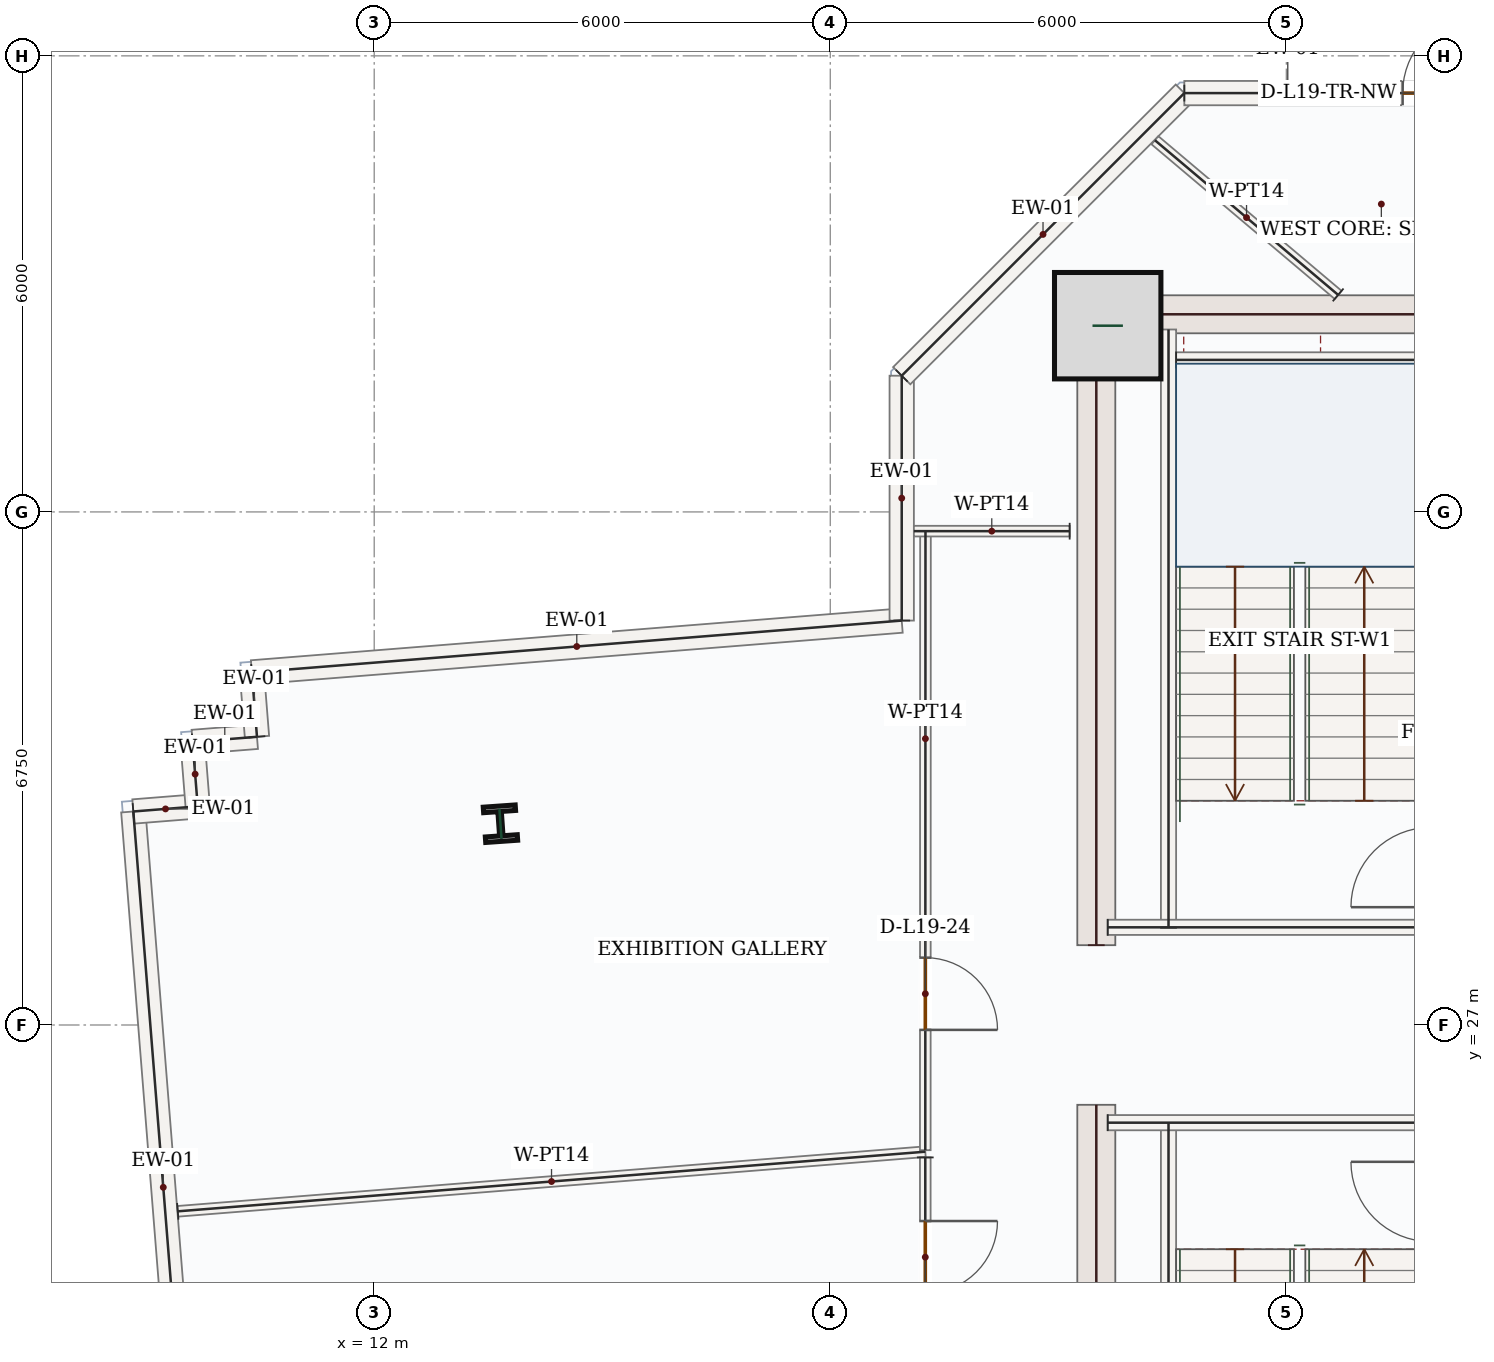
"""IFC4 building model, lengths in metres.
Left out: names, types, materials, properties, quantities, classifications, styles, units other than length and angle.
Written with IfcOpenShell. Run it as: python <this file> out.ifc"""

import sys

from ifc_helpers import new_model, si_unit, direction, frame, frame_2d, origin, origin_2d, place, context, subcontext, project, spatial, rectangle, i_section, extrude, source, transform, mapped, element, fill, save


model = new_model("IFC4")
c1 = context("Model", 3, precision=1e-05, world=origin(), true_north=direction((0.0, 1.0)))
c2 = subcontext(c1, "Body", "Model", "MODEL_VIEW")
j1 = project(units=[si_unit("LENGTHUNIT", "METRE"), si_unit("PLANEANGLEUNIT", "RADIAN")], contexts=[c1])
p1 = place(None, origin())
s1 = spatial("IfcSite", under=j1, at=p1, CompositionType="ELEMENT")
p2 = place(p1, origin())
s2 = spatial("IfcBuilding", under=s1, at=p2, CompositionType="ELEMENT")
p3 = place(p2, frame((0.0, 0.0, 87.9)))
s3 = spatial("IfcBuildingStorey", under=s2, at=p3, CompositionType="ELEMENT", Elevation=87.9)
m1 = source(origin(), c2, "Body", "SweptSolid", [
    extrude(rectangle(XDim=8.55, YDim=0.5, at=frame_2d((4.275, 0.0))), origin(), (0.0, 0.0, 1.0), 3.95),
])
for number, where, z_axis, x_axis in (
    (1, (21.5, 17.4, 0.0), (0.0, 0.0, 1.0), (0.0, 1.0, 0.0)),
    (2, (21.5, 28.05, 0.0), (0.0, 0.0, 1.0), (0.0, 1.0, 0.0)),
):
    element("IfcWall", number, at=place(p3, frame(where, z_axis=z_axis, x_axis=x_axis)), inside=s3, PredefinedType="SHEAR", context=c2, shape_type="MappedRepresentation", body=[
        mapped(m1, transform((0.0, 0.0, 0.0), x_axis=(1.0, 0.0, 0.0), y_axis=(0.0, 1.0, 0.0), z_axis=(0.0, 0.0, 1.0), scale=1.0)),
    ])
m2 = source(origin(), c2, "Body", "SweptSolid", [
    extrude(rectangle(XDim=7.0, YDim=0.5, at=frame_2d((3.5, 0.0))), origin(), (0.0, 0.0, 1.0), 3.95),
])
p4 = place(p3, frame((21.75, 36.35, 0.0), z_axis=(0.0, 0.0, 1.0), x_axis=(1.0, 0.0, 0.0)))
e3 = element("IfcWall", 3, at=p4, inside=s3, PredefinedType="SHEAR", context=c2, shape_type="MappedRepresentation", body=[
    mapped(m2, transform((0.0, 0.0, 0.0), x_axis=(1.0, 0.0, 0.0), y_axis=(0.0, 1.0, 0.0), z_axis=(0.0, 0.0, 1.0), scale=1.0)),
])
m3 = source(origin(), c2, "Body", "SweptSolid", [
    extrude(rectangle(XDim=1.4, YDim=1.4, at=origin_2d()), origin(), (0.0, 0.0, 1.0), 4.2),
])
p5 = place(p3, frame((21.65, 36.2, 0.0), z_axis=(0.0, 0.0, 1.0), x_axis=(1.0, 0.0, 0.0)))
e4 = element("IfcColumn", 4, at=p5, inside=s3, PredefinedType="COLUMN", context=c2, shape_type="MappedRepresentation", body=[
    mapped(m3, transform((0.0, 0.0, 0.0), x_axis=(1.0, 0.0, 0.0), y_axis=(0.0, 1.0, 0.0), z_axis=(0.0, 0.0, 1.0), scale=1.0)),
])
m4 = source(origin(), c2, "Body", "SweptSolid", [
    extrude(i_section(OverallWidth=0.421, OverallDepth=0.465, WebThickness=0.045, FlangeThickness=0.073, FilletRadius=0.018, at=origin_2d()), origin(), (0.0, 0.0, 1.0), 4.2),
])
p6 = place(p3, frame((13.661, 29.648, 0.0), z_axis=(0.0, 0.0, 1.0), x_axis=(0.99756405026, 0.069756473744, 0.0)))
e5 = element("IfcColumn", 5, at=p6, inside=s3, PredefinedType="COLUMN", context=c2, shape_type="MappedRepresentation", body=[
    mapped(m4, transform((0.0, 0.0, 0.0), x_axis=(1.0, 0.0, 0.0), y_axis=(0.0, 1.0, 0.0), z_axis=(0.0, 0.0, 1.0), scale=1.0)),
])
m5 = source(origin(), c2, "Body", "SweptSolid", [
    extrude(rectangle(XDim=9.92, YDim=0.32, at=frame_2d((4.96, 0.0))), origin(), (0.0, 0.0, 1.0), 3.95),
])
p7 = place(p3, frame((9.619, 19.92, 0.0), z_axis=(0.0, 0.0, 1.0), x_axis=(-0.07949480177, 0.996835280521, 0.0)))
e6 = element("IfcWall", 6, at=p7, inside=s3, PredefinedType="SOLIDWALL", context=c2, shape_type="MappedRepresentation", body=[
    mapped(m5, transform((0.0, 0.0, 0.0), x_axis=(1.0, 0.0, 0.0), y_axis=(0.0, 1.0, 0.0), z_axis=(0.0, 0.0, 1.0), scale=1.0)),
])
m6 = source(origin(), c2, "Body", "SweptSolid", [
    extrude(rectangle(XDim=0.85, YDim=0.32, at=frame_2d((0.425, 0.0))), origin(), (0.0, 0.0, 1.0), 3.95),
])
p8 = place(p3, frame((8.831, 29.809, 0.0), z_axis=(0.0, 0.0, 1.0), x_axis=(0.996828965123, 0.079573954853, 0.0)))
e7 = element("IfcWall", 7, at=p8, inside=s3, PredefinedType="SOLIDWALL", context=c2, shape_type="MappedRepresentation", body=[
    mapped(m6, transform((0.0, 0.0, 0.0), x_axis=(1.0, 0.0, 0.0), y_axis=(0.0, 1.0, 0.0), z_axis=(0.0, 0.0, 1.0), scale=1.0)),
])
m7 = source(origin(), c2, "Body", "SweptSolid", [
    extrude(rectangle(XDim=0.85, YDim=0.32, at=frame_2d((0.425, 0.0))), origin(), (0.0, 0.0, 1.0), 3.95),
])
for number, where, z_axis, x_axis in (
    (8, (9.678, 29.876, 0.0), (0.0, 0.0, 1.0), (-0.08, 0.997, 0.0)),
    (9, (9.61, 30.724, 0.0), (0.0, 0.0, 1.0), (0.997, 0.079, 0.0)),
    (10, (10.458, 30.791, 0.0), (0.0, 0.0, 1.0), (-0.08, 0.997, 0.0)),
):
    element("IfcWall", number, at=place(p3, frame(where, z_axis=z_axis, x_axis=x_axis)), inside=s3, PredefinedType="SOLIDWALL", context=c2, shape_type="MappedRepresentation", body=[
        mapped(m7, transform((0.0, 0.0, 0.0), x_axis=(1.0, 0.0, 0.0), y_axis=(0.0, 1.0, 0.0), z_axis=(0.0, 0.0, 1.0), scale=1.0)),
    ])
m8 = source(origin(), c2, "Body", "SweptSolid", [
    extrude(rectangle(XDim=8.577, YDim=0.32, at=frame_2d((4.289, 0.0))), origin(), (0.0, 0.0, 1.0), 3.95),
])
p9 = place(p3, frame((10.39, 31.639, 0.0), z_axis=(0.0, 0.0, 1.0), x_axis=(0.996834708052, 0.07950198, 0.0)))
e11 = element("IfcWall", 11, at=p9, inside=s3, PredefinedType="SOLIDWALL", context=c2, shape_type="MappedRepresentation", body=[
    mapped(m8, transform((0.0, 0.0, 0.0), x_axis=(1.0, 0.0, 0.0), y_axis=(0.0, 1.0, 0.0), z_axis=(0.0, 0.0, 1.0), scale=1.0)),
])
m9 = source(origin(), c2, "Body", "SweptSolid", [
    extrude(rectangle(XDim=3.221, YDim=0.32, at=frame_2d((1.611, 0.0))), origin(), (0.0, 0.0, 1.0), 3.95),
])
p10 = place(p3, frame((18.94, 32.321, 0.0), z_axis=(0.0, 0.0, 1.0), x_axis=(0.0, 1.0, 0.0)))
e12 = element("IfcWall", 12, at=p10, inside=s3, PredefinedType="SOLIDWALL", context=c2, shape_type="MappedRepresentation", body=[
    mapped(m9, transform((0.0, 0.0, 0.0), x_axis=(1.0, 0.0, 0.0), y_axis=(0.0, 1.0, 0.0), z_axis=(0.0, 0.0, 1.0), scale=1.0)),
])
m10 = source(origin(), c2, "Body", "SweptSolid", [
    extrude(rectangle(XDim=5.258, YDim=0.32, at=frame_2d((2.629, 0.0))), origin(), (0.0, 0.0, 1.0), 3.95),
])
p11 = place(p3, frame((18.94, 35.542, 0.0), z_axis=(0.0, 0.0, 1.0), x_axis=(0.707106781187, 0.707106781187, 0.0)))
e13 = element("IfcWall", 13, at=p11, inside=s3, PredefinedType="SOLIDWALL", context=c2, shape_type="MappedRepresentation", body=[
    mapped(m10, transform((0.0, 0.0, 0.0), x_axis=(1.0, 0.0, 0.0), y_axis=(0.0, 1.0, 0.0), z_axis=(0.0, 0.0, 1.0), scale=1.0)),
])
p12 = place(p3, frame((22.658, 39.26, 0.0), z_axis=(0.0, 0.0, 1.0), x_axis=(1.0, 0.0, 0.0)))
e14 = element("IfcWall", 14, at=p12, inside=s3, PredefinedType="SOLIDWALL", context=c2, shape_type="SweptSolid", body=[
    extrude(rectangle(XDim=5.683, YDim=0.32, at=frame_2d((2.842, 0.0))), origin(), (0.0, 0.0, 1.0), 3.95),
])
p13 = place(p12, frame((2.872, 0.0, 0.0)))
e15 = element("IfcOpeningElement", 15, at=p13, cuts=e14, PredefinedType="OPENING", context=c2, shape_type="SweptSolid", body=[
    extrude(rectangle(XDim=1.05, YDim=2.15, at=frame_2d((0.525, 1.075))), frame((0.0, 0.17, 0.0), z_axis=(0.0, -1.0, 0.0), x_axis=(1.0, 0.0, 0.0)), (0.0, 0.0, 1.0), 0.34),
])
m11 = source(origin(), c2, "Body", "SweptSolid", [
    extrude(rectangle(XDim=7.87, YDim=0.2, at=frame_2d((3.935, 0.0))), origin(), (0.0, 0.0, 1.0), 3.95),
])
for number, where, z_axis, x_axis in (
    (16, (22.45, 17.85, 0.0), (0.0, 0.0, 1.0), (0.0, 1.0, 0.0)),
    (17, (22.45, 28.28, 0.0), (0.0, 0.0, 1.0), (0.0, 1.0, 0.0)),
):
    element("IfcWall", number, at=place(p3, frame(where, z_axis=z_axis, x_axis=x_axis)), inside=s3, PredefinedType="SOLIDWALL", context=c2, shape_type="MappedRepresentation", body=[
        mapped(m11, transform((0.0, 0.0, 0.0), x_axis=(1.0, 0.0, 0.0), y_axis=(0.0, 1.0, 0.0), z_axis=(0.0, 0.0, 1.0), scale=1.0)),
    ])
m12 = source(origin(), c2, "Body", "SweptSolid", [
    extrude(rectangle(XDim=4.25, YDim=0.2, at=frame_2d((2.125, 0.0))), origin(), (0.0, 0.0, 1.0), 3.95),
])
for number, where, z_axis, x_axis in (
    (18, (21.65, 25.715, 0.0), (0.0, 0.0, 1.0), (1.0, 0.0, 0.0)),
    (19, (21.65, 28.285, 0.0), (0.0, 0.0, 1.0), (1.0, 0.0, 0.0)),
):
    element("IfcWall", number, at=place(p3, frame(where, z_axis=z_axis, x_axis=x_axis)), inside=s3, PredefinedType="SOLIDWALL", context=c2, shape_type="MappedRepresentation", body=[
        mapped(m12, transform((0.0, 0.0, 0.0), x_axis=(1.0, 0.0, 0.0), y_axis=(0.0, 1.0, 0.0), z_axis=(0.0, 0.0, 1.0), scale=1.0)),
    ])
m13 = source(origin(), c2, "Body", "SweptSolid", [
    extrude(rectangle(XDim=3.25, YDim=0.2, at=frame_2d((1.625, 0.0))), origin(), (0.0, 0.0, 1.0), 3.95),
])
p14 = place(p3, frame((22.55, 35.75, 0.0), z_axis=(0.0, 0.0, 1.0), x_axis=(1.0, 0.0, 0.0)))
e20 = element("IfcWall", 20, at=p14, inside=s3, PredefinedType="SOLIDWALL", context=c2, shape_type="MappedRepresentation", body=[
    mapped(m13, transform((0.0, 0.0, 0.0), x_axis=(1.0, 0.0, 0.0), y_axis=(0.0, 1.0, 0.0), z_axis=(0.0, 0.0, 1.0), scale=1.0)),
])
m14 = source(origin(), c2, "Body", "SweptSolid", [
    extrude(rectangle(XDim=3.155, YDim=0.14, at=frame_2d((1.577, 0.0))), origin(), (0.0, 0.0, 1.0), 3.95),
])
p15 = place(p3, frame((24.682, 36.605, 0.0), z_axis=(0.0, 0.0, 1.0), x_axis=(-0.76411384058, 0.645081420159, 0.0)))
e21 = element("IfcWall", 21, at=p15, inside=s3, PredefinedType="PARTITIONING", context=c2, shape_type="MappedRepresentation", body=[
    mapped(m14, transform((0.0, 0.0, 0.0), x_axis=(1.0, 0.0, 0.0), y_axis=(0.0, 1.0, 0.0), z_axis=(0.0, 0.0, 1.0), scale=1.0)),
])
m15 = source(origin(), c2, "Body", "SweptSolid", [
    extrude(rectangle(XDim=9.865, YDim=0.14, at=frame_2d((4.933, 0.0))), origin(), (0.0, 0.0, 1.0), 3.95),
])
p16 = place(p3, frame((9.416, 24.549, 0.0), z_axis=(0.0, 0.0, 1.0), x_axis=(0.996833900052, 0.079512110446, 0.0)))
e22 = element("IfcWall", 22, at=p16, inside=s3, PredefinedType="PARTITIONING", context=c2, shape_type="MappedRepresentation", body=[
    mapped(m15, transform((0.0, 0.0, 0.0), x_axis=(1.0, 0.0, 0.0), y_axis=(0.0, 1.0, 0.0), z_axis=(0.0, 0.0, 1.0), scale=1.0)),
])
p17 = place(p3, frame((19.25, 25.258, 0.0), z_axis=(0.0, 0.0, 1.0), x_axis=(0.000102701037, -0.999999994726, 0.0)))
e23 = element("IfcWall", 23, at=p17, inside=s3, PredefinedType="PARTITIONING", context=c2, shape_type="SweptSolid", body=[
    extrude(rectangle(XDim=4.754, YDim=0.14, at=frame_2d((2.377, 0.0))), origin(), (0.0, 0.0, 1.0), 3.95),
])
p18 = place(p17, frame((0.837, 0.0, 0.0)))
e24 = element("IfcOpeningElement", 24, at=p18, cuts=e23, PredefinedType="OPENING", context=c2, shape_type="SweptSolid", body=[
    extrude(rectangle(XDim=0.95, YDim=2.15, at=frame_2d((0.475, 1.075))), frame((0.0, 0.08, 0.0), z_axis=(0.0, -1.0, 0.0), x_axis=(1.0, 0.0, 0.0)), (0.0, 0.0, 1.0), 0.16),
])
p19 = place(p3, frame((19.253, 33.497, 0.0), z_axis=(0.0, 0.0, 1.0), x_axis=(-0.000329746078, -0.999999945634, 0.0)))
e25 = element("IfcWall", 25, at=p19, inside=s3, PredefinedType="PARTITIONING", context=c2, shape_type="SweptSolid", body=[
    extrude(rectangle(XDim=8.144, YDim=0.14, at=frame_2d((4.072, 0.0))), origin(), (0.0, 0.0, 1.0), 3.95),
])
p20 = place(p19, frame((5.611, 0.0, 0.0)))
e26 = element("IfcOpeningElement", 26, at=p20, cuts=e25, PredefinedType="OPENING", context=c2, shape_type="SweptSolid", body=[
    extrude(rectangle(XDim=0.95, YDim=2.15, at=frame_2d((0.475, 1.075))), frame((0.0, 0.08, 0.0), z_axis=(0.0, -1.0, 0.0), x_axis=(1.0, 0.0, 0.0)), (0.0, 0.0, 1.0), 0.16),
])
m16 = source(origin(), c2, "Body", "SweptSolid", [
    extrude(rectangle(XDim=2.049, YDim=0.14, at=frame_2d((1.025, 0.0))), origin(), (0.0, 0.0, 1.0), 3.95),
])
p21 = place(p3, frame((21.149, 33.497, 0.0), z_axis=(0.0, 0.0, 1.0), x_axis=(-0.999999936133, 0.000357398119, 0.0)))
e27 = element("IfcWall", 27, at=p21, inside=s3, PredefinedType="PARTITIONING", context=c2, shape_type="MappedRepresentation", body=[
    mapped(m16, transform((0.0, 0.0, 0.0), x_axis=(1.0, 0.0, 0.0), y_axis=(0.0, 1.0, 0.0), z_axis=(0.0, 0.0, 1.0), scale=1.0)),
])
m17 = source(origin(), c2, "Body", "SweptSolid", [
    extrude(rectangle(XDim=1.05, YDim=2.15, at=frame_2d((0.525, 1.075))), frame((0.0, 0.025, 0.0), z_axis=(0.0, -1.0, 0.0), x_axis=(1.0, 0.0, 0.0)), (0.0, 0.0, 1.0), 0.05),
])
p22 = place(p13, origin())
e28 = element("IfcDoor", 28, at=p22, inside=s3, OperationType="SINGLE_SWING_RIGHT", PredefinedType="DOOR", context=c2, shape_type="MappedRepresentation", body=[
    mapped(m17, transform((0.0, 0.0, 0.0), x_axis=(1.0, 0.0, 0.0), y_axis=(0.0, 1.0, 0.0), z_axis=(0.0, 0.0, 1.0), scale=1.0)),
])
fill(e15, e28)
m18 = source(origin(), c2, "Body", "SweptSolid", [
    extrude(rectangle(XDim=0.95, YDim=2.15, at=frame_2d((0.475, 1.075))), frame((0.0, 0.025, 0.0), z_axis=(0.0, -1.0, 0.0), x_axis=(1.0, 0.0, 0.0)), (0.0, 0.0, 1.0), 0.05),
])
p23 = place(p20, origin())
e29 = element("IfcDoor", 29, at=p23, inside=s3, OperationType="SINGLE_SWING_RIGHT", PredefinedType="DOOR", context=c2, shape_type="MappedRepresentation", body=[
    mapped(m18, transform((0.0, 0.0, 0.0), x_axis=(1.0, 0.0, 0.0), y_axis=(0.0, 1.0, 0.0), z_axis=(0.0, 0.0, 1.0), scale=1.0)),
])
fill(e26, e29)
p24 = place(p18, origin())
e30 = element("IfcDoor", 30, at=p24, inside=s3, OperationType="SINGLE_SWING_LEFT", PredefinedType="DOOR", context=c2, shape_type="MappedRepresentation", body=[
    mapped(m18, transform((0.0, 0.0, 0.0), x_axis=(1.0, 0.0, 0.0), y_axis=(0.0, 1.0, 0.0), z_axis=(0.0, 0.0, 1.0), scale=1.0)),
])
fill(e24, e30)
save(model, sys.argv[1])
